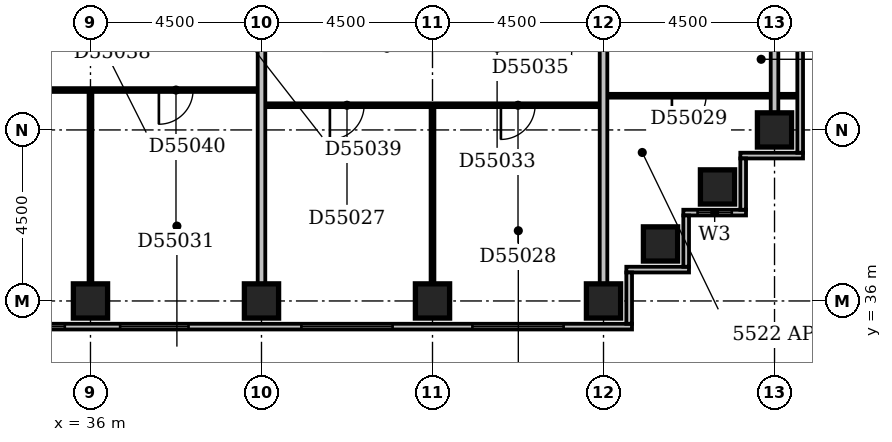
"""IFC4 building model, lengths in metres.
Left out: names, types, materials, properties, quantities, classifications, styles, units other than length and angle.
Written with IfcOpenShell. Run it as: python <this file> out.ifc"""

import sys

from ifc_helpers import new_model, si_unit, direction, frame, frame_2d, origin, origin_2d, place, context, subcontext, project, spatial, rectangle, extrude, element, fill, save


model = new_model("IFC4")
c1 = context("Model", 3, precision=1e-05, world=origin(), true_north=direction((0.0, 1.0)))
c2 = subcontext(c1, "Body", "Model", "MODEL_VIEW")
j1 = project(units=[si_unit("LENGTHUNIT", "METRE"), si_unit("PLANEANGLEUNIT", "RADIAN")], contexts=[c1])
p1 = place(None, origin())
s1 = spatial("IfcSite", under=j1, at=p1, CompositionType="ELEMENT")
p2 = place(p1, origin())
s2 = spatial("IfcBuilding", under=s1, at=p2, CompositionType="ELEMENT")
p3 = place(p2, frame((0.0, 0.0, 215.0)))
s3 = spatial("IfcBuildingStorey", under=s2, at=p3, CompositionType="ELEMENT", Elevation=215.0)
for number, where, z_axis, x_axis in (
    (1, (36.0, 36.0, -0.3), (0.0, 0.0, 1.0), (1.0, 0.0, 0.0)),
    (2, (40.5, 36.0, -0.3), (0.0, 0.0, 1.0), (1.0, 0.0, 0.0)),
    (3, (45.0, 36.0, -0.3), (0.0, 0.0, 1.0), (1.0, 0.0, 0.0)),
    (4, (49.5, 36.0, -0.3), (0.0, 0.0, 1.0), (1.0, 0.0, 0.0)),
    (5, (51.0, 37.5, -0.3), (0.0, 0.0, 1.0), (1.0, 0.0, 0.0)),
    (6, (52.5, 39.0, -0.3), (0.0, 0.0, 1.0), (1.0, 0.0, 0.0)),
    (7, (54.0, 40.5, -0.3), (0.0, 0.0, 1.0), (1.0, 0.0, 0.0)),
):
    element("IfcColumn", number, at=place(p3, frame(where, z_axis=z_axis, x_axis=x_axis)), inside=s3, PredefinedType="COLUMN", context=c2, shape_type="SweptSolid", body=[
        extrude(rectangle(XDim=0.9, YDim=0.9, at=origin_2d()), origin(), (0.0, 0.0, 1.0), 3.6),
    ])
p4 = place(p3, frame((23.1, 35.325, 0.0), z_axis=(0.0, 0.0, 1.0), x_axis=(1.0, 0.0, 0.0)))
e8 = element("IfcWall", 8, at=p4, inside=s3, PredefinedType="STANDARD", context=c2, shape_type="SweptSolid", body=[
    extrude(rectangle(XDim=27.15, YDim=0.15, at=frame_2d((13.575, 0.0))), origin(), (0.0, 0.0, 1.0), 2.7),
])
p5 = place(p4, frame((0.45, 0.0, 0.6)))
e9 = element("IfcOpeningElement", 9, at=p5, cuts=e8, PredefinedType="OPENING", context=c2, shape_type="SweptSolid", body=[
    extrude(rectangle(XDim=2.4, YDim=1.8, at=frame_2d((1.2, 0.9))), frame((0.0, 0.087, 0.0), z_axis=(0.0, -1.0, 0.0), x_axis=(1.0, 0.0, 0.0)), (0.0, 0.0, 1.0), 0.174),
])
p6 = place(p4, frame((4.95, 0.0, 0.6)))
e10 = element("IfcOpeningElement", 10, at=p6, cuts=e8, PredefinedType="OPENING", context=c2, shape_type="SweptSolid", body=[
    extrude(rectangle(XDim=2.4, YDim=1.8, at=frame_2d((1.2, 0.9))), frame((0.0, 0.087, 0.0), z_axis=(0.0, -1.0, 0.0), x_axis=(1.0, 0.0, 0.0)), (0.0, 0.0, 1.0), 0.174),
])
p7 = place(p4, frame((10.424, 0.0, 0.6)))
e11 = element("IfcOpeningElement", 11, at=p7, cuts=e8, PredefinedType="OPENING", context=c2, shape_type="SweptSolid", body=[
    extrude(rectangle(XDim=1.8, YDim=1.8, at=frame_2d((0.9, 0.9))), frame((0.0, 0.087, 0.0), z_axis=(0.0, -1.0, 0.0), x_axis=(1.0, 0.0, 0.0)), (0.0, 0.0, 1.0), 0.174),
])
p8 = place(p4, frame((13.68, 0.0, 0.6)))
e12 = element("IfcOpeningElement", 12, at=p8, cuts=e8, PredefinedType="OPENING", context=c2, shape_type="SweptSolid", body=[
    extrude(rectangle(XDim=1.8, YDim=1.8, at=frame_2d((0.9, 0.9))), frame((0.0, 0.087, 0.0), z_axis=(0.0, -1.0, 0.0), x_axis=(1.0, 0.0, 0.0)), (0.0, 0.0, 1.0), 0.174),
])
p9 = place(p4, frame((18.45, 0.0, 0.6)))
e13 = element("IfcOpeningElement", 13, at=p9, cuts=e8, PredefinedType="OPENING", context=c2, shape_type="SweptSolid", body=[
    extrude(rectangle(XDim=2.4, YDim=1.8, at=frame_2d((1.2, 0.9))), frame((0.0, 0.087, 0.0), z_axis=(0.0, -1.0, 0.0), x_axis=(1.0, 0.0, 0.0)), (0.0, 0.0, 1.0), 0.174),
])
p10 = place(p4, frame((22.95, 0.0, 0.6)))
e14 = element("IfcOpeningElement", 14, at=p10, cuts=e8, PredefinedType="OPENING", context=c2, shape_type="SweptSolid", body=[
    extrude(rectangle(XDim=2.4, YDim=1.8, at=frame_2d((1.2, 0.9))), frame((0.0, 0.087, 0.0), z_axis=(0.0, -1.0, 0.0), x_axis=(1.0, 0.0, 0.0)), (0.0, 0.0, 1.0), 0.174),
])
p11 = place(p3, frame((50.175, 35.4, 0.0), z_axis=(0.0, 0.0, 1.0), x_axis=(0.0, 1.0, 0.0)))
e15 = element("IfcWall", 15, at=p11, inside=s3, PredefinedType="STANDARD", context=c2, shape_type="SweptSolid", body=[
    extrude(rectangle(XDim=1.35, YDim=0.15, at=frame_2d((0.675, 0.0))), origin(), (0.0, 0.0, 1.0), 2.7),
])
p12 = place(p3, frame((50.1, 36.825, 0.0), z_axis=(0.0, 0.0, 1.0), x_axis=(1.0, 0.0, 0.0)))
e16 = element("IfcWall", 16, at=p12, inside=s3, PredefinedType="STANDARD", context=c2, shape_type="SweptSolid", body=[
    extrude(rectangle(XDim=1.65, YDim=0.15, at=frame_2d((0.825, 0.0))), origin(), (0.0, 0.0, 1.0), 2.7),
])
p13 = place(p3, frame((51.675, 36.9, 0.0), z_axis=(0.0, 0.0, 1.0), x_axis=(0.0, 1.0, 0.0)))
e17 = element("IfcWall", 17, at=p13, inside=s3, PredefinedType="STANDARD", context=c2, shape_type="SweptSolid", body=[
    extrude(rectangle(XDim=1.35, YDim=0.15, at=frame_2d((0.675, 0.0))), origin(), (0.0, 0.0, 1.0), 2.7),
])
p14 = place(p3, frame((51.6, 38.325, 0.0), z_axis=(0.0, 0.0, 1.0), x_axis=(1.0, 0.0, 0.0)))
e18 = element("IfcWall", 18, at=p14, inside=s3, PredefinedType="STANDARD", context=c2, shape_type="SweptSolid", body=[
    extrude(rectangle(XDim=1.65, YDim=0.15, at=frame_2d((0.825, 0.0))), origin(), (0.0, 0.0, 1.0), 2.7),
])
p15 = place(p14, frame((0.375, 0.0, 0.6)))
e19 = element("IfcOpeningElement", 19, at=p15, cuts=e18, PredefinedType="OPENING", context=c2, shape_type="SweptSolid", body=[
    extrude(rectangle(XDim=0.9, YDim=1.8, at=frame_2d((0.45, 0.9))), frame((0.0, 0.087, 0.0), z_axis=(0.0, -1.0, 0.0), x_axis=(1.0, 0.0, 0.0)), (0.0, 0.0, 1.0), 0.174),
])
p16 = place(p3, frame((53.175, 38.4, 0.0), z_axis=(0.0, 0.0, 1.0), x_axis=(0.0, 1.0, 0.0)))
e20 = element("IfcWall", 20, at=p16, inside=s3, PredefinedType="STANDARD", context=c2, shape_type="SweptSolid", body=[
    extrude(rectangle(XDim=1.35, YDim=0.15, at=frame_2d((0.675, 0.0))), origin(), (0.0, 0.0, 1.0), 2.7),
])
p17 = place(p3, frame((53.1, 39.825, 0.0), z_axis=(0.0, 0.0, 1.0), x_axis=(1.0, 0.0, 0.0)))
e21 = element("IfcWall", 21, at=p17, inside=s3, PredefinedType="STANDARD", context=c2, shape_type="SweptSolid", body=[
    extrude(rectangle(XDim=1.65, YDim=0.15, at=frame_2d((0.825, 0.0))), origin(), (0.0, 0.0, 1.0), 2.7),
])
p18 = place(p3, frame((54.675, 39.9, 0.0), z_axis=(0.0, 0.0, 1.0), x_axis=(0.0, 1.0, 0.0)))
e22 = element("IfcWall", 22, at=p18, inside=s3, PredefinedType="STANDARD", context=c2, shape_type="SweptSolid", body=[
    extrude(rectangle(XDim=14.85, YDim=0.15, at=frame_2d((7.425, 0.0))), origin(), (0.0, 0.0, 1.0), 2.7),
])
p19 = place(p3, frame((36.0, 36.45, 0.0), z_axis=(0.0, 0.0, 1.0), x_axis=(0.0, 1.0, 0.0)))
e23 = element("IfcWall", 23, at=p19, inside=s3, PredefinedType="PARTITIONING", context=c2, shape_type="SweptSolid", body=[
    extrude(rectangle(XDim=5.05, YDim=0.1, at=frame_2d((2.525, 0.0))), origin(), (0.0, 0.0, 1.0), 2.4),
])
p20 = place(p3, frame((40.5, 36.45, 0.0), z_axis=(0.0, 0.0, 1.0), x_axis=(0.0, 1.0, 0.0)))
e24 = element("IfcWall", 24, at=p20, inside=s3, PredefinedType="PARTITIONING", context=c2, shape_type="SweptSolid", body=[
    extrude(rectangle(XDim=12.95, YDim=0.2, at=frame_2d((6.475, 0.0))), origin(), (0.0, 0.0, 1.0), 3.3),
])
p21 = place(p3, frame((45.0, 36.45, 0.0), z_axis=(0.0, 0.0, 1.0), x_axis=(0.0, 1.0, 0.0)))
e25 = element("IfcWall", 25, at=p21, inside=s3, PredefinedType="PARTITIONING", context=c2, shape_type="SweptSolid", body=[
    extrude(rectangle(XDim=4.65, YDim=0.1, at=frame_2d((2.325, 0.0))), origin(), (0.0, 0.0, 1.0), 2.6),
])
p22 = place(p3, frame((49.5, 36.45, 0.0), z_axis=(0.0, 0.0, 1.0), x_axis=(0.0, 1.0, 0.0)))
e26 = element("IfcWall", 26, at=p22, inside=s3, PredefinedType="PARTITIONING", context=c2, shape_type="SweptSolid", body=[
    extrude(rectangle(XDim=12.95, YDim=0.2, at=frame_2d((6.475, 0.0))), origin(), (0.0, 0.0, 1.0), 3.3),
])
p23 = place(p3, frame((54.0, 40.95, 0.0), z_axis=(0.0, 0.0, 1.0), x_axis=(0.0, 1.0, 0.0)))
e27 = element("IfcWall", 27, at=p23, inside=s3, PredefinedType="PARTITIONING", context=c2, shape_type="SweptSolid", body=[
    extrude(rectangle(XDim=8.1, YDim=0.2, at=frame_2d((4.05, 0.0))), origin(), (0.0, 0.0, 1.0), 2.7),
])
p24 = place(p3, frame((40.6, 41.15, 0.0), z_axis=(0.0, 0.0, 1.0), x_axis=(1.0, 0.0, 0.0)))
e28 = element("IfcWall", 28, at=p24, inside=s3, PredefinedType="PARTITIONING", context=c2, shape_type="SweptSolid", body=[
    extrude(rectangle(XDim=8.8, YDim=0.1, at=frame_2d((4.4, 0.0))), origin(), (0.0, 0.0, 1.0), 3.3),
])
p25 = place(p24, frame((1.7, 0.0, 0.0)))
e29 = element("IfcOpeningElement", 29, at=p25, cuts=e28, PredefinedType="OPENING", context=c2, shape_type="SweptSolid", body=[
    extrude(rectangle(XDim=0.9, YDim=2.1, at=frame_2d((0.45, 1.05))), frame((0.0, 0.062, 0.0), z_axis=(0.0, -1.0, 0.0), x_axis=(1.0, 0.0, 0.0)), (0.0, 0.0, 1.0), 0.124),
])
p26 = place(p24, frame((6.2, 0.0, 0.0)))
e30 = element("IfcOpeningElement", 30, at=p26, cuts=e28, PredefinedType="OPENING", context=c2, shape_type="SweptSolid", body=[
    extrude(rectangle(XDim=0.9, YDim=2.1, at=frame_2d((0.45, 1.05))), frame((0.0, 0.062, 0.0), z_axis=(0.0, -1.0, 0.0), x_axis=(1.0, 0.0, 0.0)), (0.0, 0.0, 1.0), 0.124),
])
p27 = place(p3, frame((49.6, 41.4, 0.0), z_axis=(0.0, 0.0, 1.0), x_axis=(1.0, 0.0, 0.0)))
e31 = element("IfcWall", 31, at=p27, inside=s3, PredefinedType="PARTITIONING", context=c2, shape_type="SweptSolid", body=[
    extrude(rectangle(XDim=5.0, YDim=0.1, at=frame_2d((2.5, 0.0))), origin(), (0.0, 0.0, 1.0), 3.3),
])
p28 = place(p27, frame((1.7, 0.0, 0.0)))
e32 = element("IfcOpeningElement", 32, at=p28, cuts=e31, PredefinedType="OPENING", context=c2, shape_type="SweptSolid", body=[
    extrude(rectangle(XDim=0.9, YDim=2.1, at=frame_2d((0.45, 1.05))), frame((0.0, 0.062, 0.0), z_axis=(0.0, -1.0, 0.0), x_axis=(1.0, 0.0, 0.0)), (0.0, 0.0, 1.0), 0.124),
])
p29 = place(p3, frame((27.1, 41.55, 0.0), z_axis=(0.0, 0.0, 1.0), x_axis=(1.0, 0.0, 0.0)))
e33 = element("IfcWall", 33, at=p29, inside=s3, PredefinedType="PARTITIONING", context=c2, shape_type="SweptSolid", body=[
    extrude(rectangle(XDim=13.3, YDim=0.1, at=frame_2d((6.65, 0.0))), origin(), (0.0, 0.0, 1.0), 3.3),
])
p30 = place(p29, frame((3.9, 0.0, 0.0)))
e34 = element("IfcOpeningElement", 34, at=p30, cuts=e33, PredefinedType="OPENING", context=c2, shape_type="SweptSolid", body=[
    extrude(rectangle(XDim=0.9, YDim=2.1, at=frame_2d((0.45, 1.05))), frame((0.0, 0.062, 0.0), z_axis=(0.0, -1.0, 0.0), x_axis=(1.0, 0.0, 0.0)), (0.0, 0.0, 1.0), 0.124),
])
p31 = place(p29, frame((10.7, 0.0, 0.0)))
e35 = element("IfcOpeningElement", 35, at=p31, cuts=e33, PredefinedType="OPENING", context=c2, shape_type="SweptSolid", body=[
    extrude(rectangle(XDim=0.9, YDim=2.1, at=frame_2d((0.45, 1.05))), frame((0.0, 0.062, 0.0), z_axis=(0.0, -1.0, 0.0), x_axis=(1.0, 0.0, 0.0)), (0.0, 0.0, 1.0), 0.124),
])
p32 = place(p7, origin())
e36 = element("IfcWindow", 36, at=p32, inside=s3, PartitioningType="SINGLE_PANEL", PredefinedType="WINDOW", context=c2, shape_type="SweptSolid", body=[
    extrude(rectangle(XDim=1.8, YDim=1.8, at=frame_2d((0.9, 0.9))), frame((0.0, 0.03, 0.0), z_axis=(0.0, -1.0, 0.0), x_axis=(1.0, 0.0, 0.0)), (0.0, 0.0, 1.0), 0.06),
])
fill(e11, e36)
p33 = place(p8, origin())
e37 = element("IfcWindow", 37, at=p33, inside=s3, PartitioningType="SINGLE_PANEL", PredefinedType="WINDOW", context=c2, shape_type="SweptSolid", body=[
    extrude(rectangle(XDim=1.8, YDim=1.8, at=frame_2d((0.9, 0.9))), frame((0.0, 0.03, 0.0), z_axis=(0.0, -1.0, 0.0), x_axis=(1.0, 0.0, 0.0)), (0.0, 0.0, 1.0), 0.06),
])
fill(e12, e37)
p34 = place(p9, origin())
e38 = element("IfcWindow", 38, at=p34, inside=s3, PartitioningType="SINGLE_PANEL", PredefinedType="WINDOW", context=c2, shape_type="SweptSolid", body=[
    extrude(rectangle(XDim=2.4, YDim=1.8, at=frame_2d((1.2, 0.9))), frame((0.0, 0.03, 0.0), z_axis=(0.0, -1.0, 0.0), x_axis=(1.0, 0.0, 0.0)), (0.0, 0.0, 1.0), 0.06),
])
fill(e13, e38)
p35 = place(p10, origin())
e39 = element("IfcWindow", 39, at=p35, inside=s3, PartitioningType="SINGLE_PANEL", PredefinedType="WINDOW", context=c2, shape_type="SweptSolid", body=[
    extrude(rectangle(XDim=2.4, YDim=1.8, at=frame_2d((1.2, 0.9))), frame((0.0, 0.03, 0.0), z_axis=(0.0, -1.0, 0.0), x_axis=(1.0, 0.0, 0.0)), (0.0, 0.0, 1.0), 0.06),
])
fill(e14, e39)
p36 = place(p15, origin())
e40 = element("IfcWindow", 40, at=p36, inside=s3, PartitioningType="SINGLE_PANEL", PredefinedType="WINDOW", context=c2, shape_type="SweptSolid", body=[
    extrude(rectangle(XDim=0.9, YDim=1.8, at=frame_2d((0.45, 0.9))), frame((0.0, 0.03, 0.0), z_axis=(0.0, -1.0, 0.0), x_axis=(1.0, 0.0, 0.0)), (0.0, 0.0, 1.0), 0.06),
])
fill(e19, e40)
p37 = place(p25, frame((0.9, 0.0, 0.0), z_axis=(0.0, 0.0, 1.0), x_axis=(-1.0, 0.0, 0.0)))
e41 = element("IfcDoor", 41, at=p37, inside=s3, OperationType="SINGLE_SWING_RIGHT", PredefinedType="DOOR", context=c2, shape_type="SweptSolid", body=[
    extrude(rectangle(XDim=0.9, YDim=2.1, at=frame_2d((0.45, 1.05))), frame((0.0, 0.025, 0.0), z_axis=(0.0, -1.0, 0.0), x_axis=(1.0, 0.0, 0.0)), (0.0, 0.0, 1.0), 0.05),
])
fill(e29, e41)
p38 = place(p26, frame((0.9, 0.0, 0.0), z_axis=(0.0, 0.0, 1.0), x_axis=(-1.0, 0.0, 0.0)))
e42 = element("IfcDoor", 42, at=p38, inside=s3, OperationType="SINGLE_SWING_RIGHT", PredefinedType="DOOR", context=c2, shape_type="SweptSolid", body=[
    extrude(rectangle(XDim=0.9, YDim=2.1, at=frame_2d((0.45, 1.05))), frame((0.0, 0.025, 0.0), z_axis=(0.0, -1.0, 0.0), x_axis=(1.0, 0.0, 0.0)), (0.0, 0.0, 1.0), 0.05),
])
fill(e30, e42)
p39 = place(p28, frame((0.9, 0.0, 0.0), z_axis=(0.0, 0.0, 1.0), x_axis=(-1.0, 0.0, 0.0)))
e43 = element("IfcDoor", 43, at=p39, inside=s3, OperationType="SINGLE_SWING_RIGHT", PredefinedType="DOOR", context=c2, shape_type="SweptSolid", body=[
    extrude(rectangle(XDim=0.9, YDim=2.1, at=frame_2d((0.45, 1.05))), frame((0.0, 0.025, 0.0), z_axis=(0.0, -1.0, 0.0), x_axis=(1.0, 0.0, 0.0)), (0.0, 0.0, 1.0), 0.05),
])
fill(e32, e43)
p40 = place(p31, frame((0.9, 0.0, 0.0), z_axis=(0.0, 0.0, 1.0), x_axis=(-1.0, 0.0, 0.0)))
e44 = element("IfcDoor", 44, at=p40, inside=s3, OperationType="SINGLE_SWING_RIGHT", PredefinedType="DOOR", context=c2, shape_type="SweptSolid", body=[
    extrude(rectangle(XDim=0.9, YDim=2.1, at=frame_2d((0.45, 1.05))), frame((0.0, 0.025, 0.0), z_axis=(0.0, -1.0, 0.0), x_axis=(1.0, 0.0, 0.0)), (0.0, 0.0, 1.0), 0.05),
])
fill(e35, e44)
save(model, sys.argv[1])
